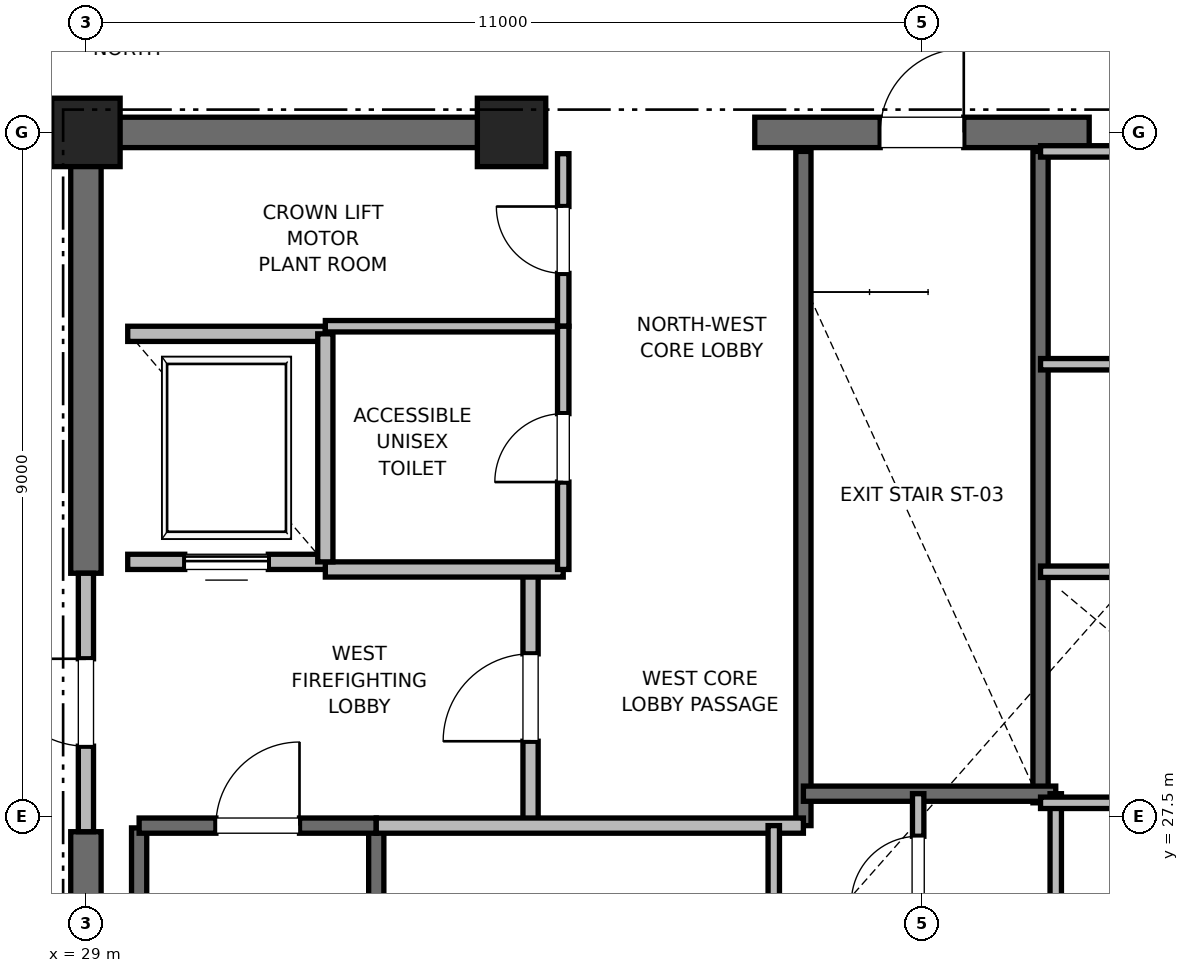
"""IFC4 building model, lengths in metres.
Left out: names, types, materials, properties, quantities, classifications, styles, units other than length and angle.
Written with IfcOpenShell. Run it as: python <this file> out.ifc"""

import sys

from ifc_helpers import new_model, si_unit, direction, frame, frame_2d, origin, origin_2d, place, context, subcontext, project, spatial, rectangle, extrude, element, fill, save


model = new_model("IFC4")
c1 = context("Model", 3, precision=1e-05, world=origin(), true_north=direction((0.0, 1.0)))
c2 = subcontext(c1, "Body", "Model", "MODEL_VIEW")
j1 = project(units=[si_unit("LENGTHUNIT", "METRE"), si_unit("PLANEANGLEUNIT", "RADIAN")], contexts=[c1])
p1 = place(None, origin())
s1 = spatial("IfcSite", under=j1, at=p1, CompositionType="ELEMENT")
p2 = place(p1, origin())
s2 = spatial("IfcBuilding", under=s1, at=p2, CompositionType="ELEMENT")
p3 = place(p2, frame((0.0, 0.0, 354.3)))
s3 = spatial("IfcBuildingStorey", under=s2, at=p3, CompositionType="ELEMENT", Elevation=354.3)
for number, where, z_axis, x_axis in (
    (1, (29.0, 36.5, 0.0), (0.0, 0.0, 1.0), (1.0, 0.0, 0.0)),
    (2, (34.6, 36.5, 0.0), (0.0, 0.0, 1.0), (1.0, 0.0, 0.0)),
):
    element("IfcColumn", number, at=place(p3, frame(where, z_axis=z_axis, x_axis=x_axis)), inside=s3, PredefinedType="PILASTER", context=c2, shape_type="SweptSolid", body=[
        extrude(rectangle(XDim=0.9, YDim=0.9, at=origin_2d()), origin(), (0.0, 0.0, 1.0), 5.5),
    ])
p4 = place(p3, frame((29.0, 36.5, 0.0), z_axis=(0.0, 0.0, 1.0), x_axis=(1.0, 0.0, 0.0)))
e3 = element("IfcWall", 3, at=p4, inside=s3, PredefinedType="SHEAR", context=c2, shape_type="SweptSolid", body=[
    extrude(rectangle(XDim=5.8, YDim=0.4, at=frame_2d((2.9, 0.0))), origin(), (0.0, 0.0, 1.0), 5.24),
])
p5 = place(p3, frame((37.8, 36.5, 0.0), z_axis=(0.0, 0.0, 1.0), x_axis=(1.0, 0.0, 0.0)))
e4 = element("IfcWall", 4, at=p5, inside=s3, PredefinedType="SHEAR", context=c2, shape_type="SweptSolid", body=[
    extrude(rectangle(XDim=4.4, YDim=0.4, at=frame_2d((2.2, 0.0))), origin(), (0.0, 0.0, 1.0), 5.24),
])
p6 = place(p5, frame((1.65, 0.0, 0.0)))
e5 = element("IfcOpeningElement", 5, at=p6, cuts=e4, PredefinedType="OPENING", context=c2, shape_type="SweptSolid", body=[
    extrude(rectangle(XDim=1.1, YDim=2.15, at=frame_2d((0.55, 1.075))), frame((0.0, 0.2, 0.0), z_axis=(0.0, -1.0, 0.0), x_axis=(1.0, 0.0, 0.0)), (0.0, 0.0, 1.0), 0.4),
])
p7 = place(p3, frame((29.0, 18.5, 0.0), z_axis=(0.0, 0.0, 1.0), x_axis=(0.0, 1.0, 0.0)))
e6 = element("IfcWall", 6, at=p7, inside=s3, PredefinedType="SHEAR", context=c2, shape_type="SweptSolid", body=[
    extrude(rectangle(XDim=8.8, YDim=0.4, at=frame_2d((4.4, 0.0))), origin(), (0.0, 0.0, 1.0), 5.24),
])
p8 = place(p3, frame((29.0, 30.7, 0.0), z_axis=(0.0, 0.0, 1.0), x_axis=(0.0, 1.0, 0.0)))
e7 = element("IfcWall", 7, at=p8, inside=s3, PredefinedType="SHEAR", context=c2, shape_type="SweptSolid", body=[
    extrude(rectangle(XDim=5.8, YDim=0.4, at=frame_2d((2.9, 0.0))), origin(), (0.0, 0.0, 1.0), 5.24),
])
p9 = place(p3, frame((29.7, 19.2, 0.0), z_axis=(0.0, 0.0, 1.0), x_axis=(0.0, 1.0, 0.0)))
e8 = element("IfcWall", 8, at=p9, inside=s3, PredefinedType="SOLIDWALL", context=c2, shape_type="SweptSolid", body=[
    extrude(rectangle(XDim=8.15, YDim=0.2, at=frame_2d((4.075, 0.0))), origin(), (0.0, 0.0, 1.0), 5.24),
])
p10 = place(p3, frame((32.82, 18.6, 0.0), z_axis=(0.0, 0.0, 1.0), x_axis=(0.0, 1.0, 0.0)))
e9 = element("IfcWall", 9, at=p10, inside=s3, PredefinedType="SOLIDWALL", context=c2, shape_type="SweptSolid", body=[
    extrude(rectangle(XDim=8.78, YDim=0.2, at=frame_2d((4.39, 0.0))), origin(), (0.0, 0.0, 1.0), 5.24),
])
p11 = place(p3, frame((29.7, 27.38, 0.0), z_axis=(0.0, 0.0, 1.0), x_axis=(1.0, 0.0, 0.0)))
e10 = element("IfcWall", 10, at=p11, inside=s3, PredefinedType="SOLIDWALL", context=c2, shape_type="SweptSolid", body=[
    extrude(rectangle(XDim=3.12, YDim=0.2, at=frame_2d((1.56, 0.0))), origin(), (0.0, 0.0, 1.0), 5.24),
])
p12 = place(p11, frame((1.01, 0.0, 0.0)))
e11 = element("IfcOpeningElement", 11, at=p12, cuts=e10, PredefinedType="OPENING", context=c2, shape_type="SweptSolid", body=[
    extrude(rectangle(XDim=1.1, YDim=2.15, at=frame_2d((0.55, 1.075))), frame((0.0, 0.1, 0.0), z_axis=(0.0, -1.0, 0.0), x_axis=(1.0, 0.0, 0.0)), (0.0, 0.0, 1.0), 0.2),
])
p13 = place(p3, frame((38.44, 27.38, 0.0), z_axis=(0.0, 0.0, 1.0), x_axis=(0.0, 1.0, 0.0)))
e12 = element("IfcWall", 12, at=p13, inside=s3, PredefinedType="SOLIDWALL", context=c2, shape_type="SweptSolid", body=[
    extrude(rectangle(XDim=8.87, YDim=0.2, at=frame_2d((4.435, 0.0))), origin(), (0.0, 0.0, 1.0), 5.24),
])
p14 = place(p3, frame((41.56, 27.68, 0.0), z_axis=(0.0, 0.0, 1.0), x_axis=(0.0, 1.0, 0.0)))
e13 = element("IfcWall", 13, at=p14, inside=s3, PredefinedType="SOLIDWALL", context=c2, shape_type="SweptSolid", body=[
    extrude(rectangle(XDim=8.57, YDim=0.2, at=frame_2d((4.285, 0.0))), origin(), (0.0, 0.0, 1.0), 5.24),
])
p15 = place(p3, frame((38.44, 27.8, 0.0), z_axis=(0.0, 0.0, 1.0), x_axis=(1.0, 0.0, 0.0)))
e14 = element("IfcWall", 14, at=p15, inside=s3, PredefinedType="SOLIDWALL", context=c2, shape_type="SweptSolid", body=[
    extrude(rectangle(XDim=3.32, YDim=0.2, at=frame_2d((1.66, 0.0))), origin(), (0.0, 0.0, 1.0), 5.24),
])
p16 = place(p3, frame((34.85, 27.38, 0.0), z_axis=(0.0, 0.0, 1.0), x_axis=(0.0, 1.0, 0.0)))
e15 = element("IfcWall", 15, at=p16, inside=s3, PredefinedType="PARTITIONING", context=c2, shape_type="SweptSolid", body=[
    extrude(rectangle(XDim=3.37, YDim=0.2, at=frame_2d((1.685, 0.0))), origin(), (0.0, 0.0, 1.0), 5.24),
])
p17 = place(p16, frame((1.11, 0.0, 0.0)))
e16 = element("IfcOpeningElement", 16, at=p17, cuts=e15, PredefinedType="OPENING", context=c2, shape_type="SweptSolid", body=[
    extrude(rectangle(XDim=1.15, YDim=2.2, at=frame_2d((0.575, 1.1))), frame((0.0, 0.1, 0.0), z_axis=(0.0, -1.0, 0.0), x_axis=(1.0, 0.0, 0.0)), (0.0, 0.0, 1.0), 0.2),
])
p18 = place(p3, frame((29.0, 27.3, 0.0), z_axis=(0.0, 0.0, 1.0), x_axis=(0.0, 1.0, 0.0)))
e17 = element("IfcWall", 17, at=p18, inside=s3, PredefinedType="PARTITIONING", context=c2, shape_type="SweptSolid", body=[
    extrude(rectangle(XDim=3.4, YDim=0.2, at=frame_2d((1.7, 0.0))), origin(), (0.0, 0.0, 1.0), 4.32),
])
p19 = place(p18, frame((1.125, 0.0, 0.0)))
e18 = element("IfcOpeningElement", 18, at=p19, cuts=e17, PredefinedType="OPENING", context=c2, shape_type="SweptSolid", body=[
    extrude(rectangle(XDim=1.15, YDim=2.2, at=frame_2d((0.575, 1.1))), frame((0.0, 0.1, 0.0), z_axis=(0.0, -1.0, 0.0), x_axis=(1.0, 0.0, 0.0)), (0.0, 0.0, 1.0), 0.2),
])
p20 = place(p3, frame((32.82, 27.38, 0.0), z_axis=(0.0, 0.0, 1.0), x_axis=(1.0, 0.0, 0.0)))
e19 = element("IfcWall", 19, at=p20, inside=s3, PredefinedType="PARTITIONING", context=c2, shape_type="SweptSolid", body=[
    extrude(rectangle(XDim=5.62, YDim=0.2, at=frame_2d((2.81, 0.0))), origin(), (0.0, 0.0, 1.0), 5.24),
])
p21 = place(p3, frame((32.15, 30.75, 0.0), z_axis=(0.0, 0.0, 1.0), x_axis=(1.0, 0.0, 0.0)))
e20 = element("IfcWall", 20, at=p21, inside=s3, PredefinedType="PARTITIONING", context=c2, shape_type="SweptSolid", body=[
    extrude(rectangle(XDim=3.13, YDim=0.2, at=frame_2d((1.565, 0.0))), origin(), (0.0, 0.0, 1.0), 5.24),
])
p22 = place(p3, frame((29.55, 30.85, 0.0), z_axis=(0.0, 0.0, 1.0), x_axis=(1.0, 0.0, 0.0)))
e21 = element("IfcWall", 21, at=p22, inside=s3, PredefinedType="SOLIDWALL", context=c2, shape_type="SweptSolid", body=[
    extrude(rectangle(XDim=2.6, YDim=0.2, at=frame_2d((1.3, 0.0))), origin(), (0.0, 0.0, 1.0), 4.32),
])
p23 = place(p22, frame((0.75, 0.0, 0.0)))
e22 = element("IfcOpeningElement", 22, at=p23, cuts=e21, PredefinedType="OPENING", context=c2, shape_type="SweptSolid", body=[
    extrude(rectangle(XDim=1.1, YDim=2.2, at=frame_2d((0.55, 1.1))), frame((0.0, 0.1, 0.0), z_axis=(0.0, -1.0, 0.0), x_axis=(1.0, 0.0, 0.0)), (0.0, 0.0, 1.0), 0.2),
])
p24 = place(p3, frame((32.15, 33.85, 0.0), z_axis=(0.0, 0.0, 1.0), x_axis=(-1.0, 0.0, 0.0)))
e23 = element("IfcWall", 23, at=p24, inside=s3, PredefinedType="SOLIDWALL", context=c2, shape_type="SweptSolid", body=[
    extrude(rectangle(XDim=2.6, YDim=0.2, at=frame_2d((1.3, 0.0))), origin(), (0.0, 0.0, 1.0), 5.24),
])
p25 = place(p3, frame((32.15, 30.85, 0.0), z_axis=(0.0, 0.0, 1.0), x_axis=(0.0, 1.0, 0.0)))
e24 = element("IfcWall", 24, at=p25, inside=s3, PredefinedType="SOLIDWALL", context=c2, shape_type="SweptSolid", body=[
    extrude(rectangle(XDim=3.0, YDim=0.2, at=frame_2d((1.5, 0.0))), origin(), (0.0, 0.0, 1.0), 5.24),
])
p26 = place(p3, frame((41.76, 23.8, 0.0), z_axis=(0.0, 0.0, 1.0), x_axis=(0.0, 1.0, 0.0)))
e25 = element("IfcWall", 25, at=p26, inside=s3, PredefinedType="PARTITIONING", context=c2, shape_type="SweptSolid", body=[
    extrude(rectangle(XDim=4.0, YDim=0.15, at=frame_2d((2.0, 0.0))), origin(), (0.0, 0.0, 1.0), 2.85),
])
p27 = place(p3, frame((39.95, 25.8, 0.0), z_axis=(0.0, 0.0, 1.0), x_axis=(0.0, 1.0, 0.0)))
e26 = element("IfcWall", 26, at=p27, inside=s3, PredefinedType="PARTITIONING", context=c2, shape_type="SweptSolid", body=[
    extrude(rectangle(XDim=2.0, YDim=0.15, at=frame_2d((1.0, 0.0))), origin(), (0.0, 0.0, 1.0), 2.85),
])
p28 = place(p27, frame((0.56, 0.0, 0.0)))
e27 = element("IfcOpeningElement", 27, at=p28, cuts=e26, PredefinedType="OPENING", context=c2, shape_type="SweptSolid", body=[
    extrude(rectangle(XDim=0.88, YDim=2.1, at=frame_2d((0.44, 1.05))), frame((0.0, 0.075, 0.0), z_axis=(0.0, -1.0, 0.0), x_axis=(1.0, 0.0, 0.0)), (0.0, 0.0, 1.0), 0.15),
])
p29 = place(p3, frame((32.15, 33.95, 0.0), z_axis=(0.0, 0.0, 1.0), x_axis=(1.0, 0.0, 0.0)))
e28 = element("IfcWall", 28, at=p29, inside=s3, PredefinedType="PARTITIONING", context=c2, shape_type="SweptSolid", body=[
    extrude(rectangle(XDim=3.13, YDim=0.15, at=frame_2d((1.565, 0.0))), origin(), (0.0, 0.0, 1.0), 2.85),
])
p30 = place(p3, frame((35.28, 33.95, 0.0), z_axis=(0.0, 0.0, 1.0), x_axis=(0.0, 1.0, 0.0)))
e29 = element("IfcWall", 29, at=p30, inside=s3, PredefinedType="PARTITIONING", context=c2, shape_type="SweptSolid", body=[
    extrude(rectangle(XDim=2.27, YDim=0.15, at=frame_2d((1.135, 0.0))), origin(), (0.0, 0.0, 1.0), 2.85),
])
p31 = place(p30, frame((0.695, 0.0, 0.0)))
e30 = element("IfcOpeningElement", 30, at=p31, cuts=e29, PredefinedType="OPENING", context=c2, shape_type="SweptSolid", body=[
    extrude(rectangle(XDim=0.88, YDim=2.1, at=frame_2d((0.44, 1.05))), frame((0.0, 0.075, 0.0), z_axis=(0.0, -1.0, 0.0), x_axis=(1.0, 0.0, 0.0)), (0.0, 0.0, 1.0), 0.15),
])
p32 = place(p3, frame((35.28, 30.75, 0.0), z_axis=(0.0, 0.0, 1.0), x_axis=(0.0, 1.0, 0.0)))
e31 = element("IfcWall", 31, at=p32, inside=s3, PredefinedType="PARTITIONING", context=c2, shape_type="SweptSolid", body=[
    extrude(rectangle(XDim=3.2, YDim=0.15, at=frame_2d((1.6, 0.0))), origin(), (0.0, 0.0, 1.0), 2.85),
])
p33 = place(p32, frame((1.15, 0.0, 0.0)))
e32 = element("IfcOpeningElement", 32, at=p33, cuts=e31, PredefinedType="OPENING", context=c2, shape_type="SweptSolid", body=[
    extrude(rectangle(XDim=0.9, YDim=2.1, at=frame_2d((0.45, 1.05))), frame((0.0, 0.075, 0.0), z_axis=(0.0, -1.0, 0.0), x_axis=(1.0, 0.0, 0.0)), (0.0, 0.0, 1.0), 0.15),
])
p34 = place(p3, frame((38.05, 18.6, 0.0), z_axis=(0.0, 0.0, 1.0), x_axis=(0.0, 1.0, 0.0)))
e33 = element("IfcWall", 33, at=p34, inside=s3, PredefinedType="PARTITIONING", context=c2, shape_type="SweptSolid", body=[
    extrude(rectangle(XDim=8.78, YDim=0.15, at=frame_2d((4.39, 0.0))), origin(), (0.0, 0.0, 1.0), 2.85),
])
p35 = place(p34, frame((3.95, 0.0, 0.0)))
e34 = element("IfcOpeningElement", 34, at=p35, cuts=e33, PredefinedType="OPENING", context=c2, shape_type="SweptSolid", body=[
    extrude(rectangle(XDim=0.88, YDim=2.1, at=frame_2d((0.44, 1.05))), frame((0.0, 0.075, 0.0), z_axis=(0.0, -1.0, 0.0), x_axis=(1.0, 0.0, 0.0)), (0.0, 0.0, 1.0), 0.15),
])
p36 = place(p3, frame((41.56, 27.68, 0.0), z_axis=(0.0, 0.0, 1.0), x_axis=(1.0, 0.0, 0.0)))
e35 = element("IfcWall", 35, at=p36, inside=s3, PredefinedType="PARTITIONING", context=c2, shape_type="SweptSolid", body=[
    extrude(rectangle(XDim=3.59, YDim=0.15, at=frame_2d((1.795, 0.0))), origin(), (0.0, 0.0, 1.0), 2.85),
])
p37 = place(p3, frame((41.56, 30.72, 0.0), z_axis=(0.0, 0.0, 1.0), x_axis=(1.0, 0.0, 0.0)))
e36 = element("IfcWall", 36, at=p37, inside=s3, PredefinedType="PARTITIONING", context=c2, shape_type="SweptSolid", body=[
    extrude(rectangle(XDim=3.59, YDim=0.15, at=frame_2d((1.795, 0.0))), origin(), (0.0, 0.0, 1.0), 2.85),
])
p38 = place(p37, frame((1.355, 0.0, 0.0)))
e37 = element("IfcOpeningElement", 37, at=p38, cuts=e36, PredefinedType="OPENING", context=c2, shape_type="SweptSolid", body=[
    extrude(rectangle(XDim=0.88, YDim=2.1, at=frame_2d((0.44, 1.05))), frame((0.0, 0.075, 0.0), z_axis=(0.0, -1.0, 0.0), x_axis=(1.0, 0.0, 0.0)), (0.0, 0.0, 1.0), 0.15),
])
p39 = place(p3, frame((41.56, 36.25, 0.0), z_axis=(0.0, 0.0, 1.0), x_axis=(1.0, 0.0, 0.0)))
e38 = element("IfcWall", 38, at=p39, inside=s3, PredefinedType="PARTITIONING", context=c2, shape_type="SweptSolid", body=[
    extrude(rectangle(XDim=2.94, YDim=0.15, at=frame_2d((1.47, 0.0))), origin(), (0.0, 0.0, 1.0), 2.85),
])
p40 = place(p3, frame((41.56, 33.45, 0.0), z_axis=(0.0, 0.0, 1.0), x_axis=(1.0, 0.0, 0.0)))
e39 = element("IfcWall", 39, at=p40, inside=s3, PredefinedType="PARTITIONING", context=c2, shape_type="SweptSolid", body=[
    extrude(rectangle(XDim=2.94, YDim=0.15, at=frame_2d((1.47, 0.0))), origin(), (0.0, 0.0, 1.0), 2.85),
])
p41 = place(p40, frame((1.03, 0.0, 0.0)))
e40 = element("IfcOpeningElement", 40, at=p41, cuts=e39, PredefinedType="OPENING", context=c2, shape_type="SweptSolid", body=[
    extrude(rectangle(XDim=0.88, YDim=2.1, at=frame_2d((0.44, 1.05))), frame((0.0, 0.075, 0.0), z_axis=(0.0, -1.0, 0.0), x_axis=(1.0, 0.0, 0.0)), (0.0, 0.0, 1.0), 0.15),
])
p42 = place(p12, origin())
e41 = element("IfcDoor", 41, at=p42, inside=s3, OperationType="SINGLE_SWING_RIGHT", PredefinedType="DOOR", context=c2, shape_type="SweptSolid", body=[
    extrude(rectangle(XDim=1.1, YDim=2.15, at=frame_2d((0.55, 1.075))), frame((0.0, 0.025, 0.0), z_axis=(0.0, -1.0, 0.0), x_axis=(1.0, 0.0, 0.0)), (0.0, 0.0, 1.0), 0.05),
])
fill(e11, e41)
p43 = place(p6, origin())
e42 = element("IfcDoor", 42, at=p43, inside=s3, OperationType="SINGLE_SWING_RIGHT", PredefinedType="DOOR", context=c2, shape_type="SweptSolid", body=[
    extrude(rectangle(XDim=1.1, YDim=2.15, at=frame_2d((0.55, 1.075))), frame((0.0, 0.025, 0.0), z_axis=(0.0, -1.0, 0.0), x_axis=(1.0, 0.0, 0.0)), (0.0, 0.0, 1.0), 0.05),
])
fill(e5, e42)
p44 = place(p17, origin())
e43 = element("IfcDoor", 43, at=p44, inside=s3, OperationType="SINGLE_SWING_LEFT", PredefinedType="DOOR", context=c2, shape_type="SweptSolid", body=[
    extrude(rectangle(XDim=1.15, YDim=2.2, at=frame_2d((0.575, 1.1))), frame((0.0, 0.025, 0.0), z_axis=(0.0, -1.0, 0.0), x_axis=(1.0, 0.0, 0.0)), (0.0, 0.0, 1.0), 0.05),
])
fill(e16, e43)
p45 = place(p19, origin())
e44 = element("IfcDoor", 44, at=p45, inside=s3, OperationType="SINGLE_SWING_RIGHT", PredefinedType="DOOR", context=c2, shape_type="SweptSolid", body=[
    extrude(rectangle(XDim=1.15, YDim=2.2, at=frame_2d((0.575, 1.1))), frame((0.0, 0.025, 0.0), z_axis=(0.0, -1.0, 0.0), x_axis=(1.0, 0.0, 0.0)), (0.0, 0.0, 1.0), 0.05),
])
fill(e18, e44)
p46 = place(p23, origin())
e45 = element("IfcDoor", 45, at=p46, inside=s3, OperationType="SLIDING_TO_RIGHT", PredefinedType="DOOR", context=c2, shape_type="SweptSolid", body=[
    extrude(rectangle(XDim=1.1, YDim=2.2, at=frame_2d((0.55, 1.1))), frame((0.0, 0.025, 0.0), z_axis=(0.0, -1.0, 0.0), x_axis=(1.0, 0.0, 0.0)), (0.0, 0.0, 1.0), 0.05),
])
fill(e22, e45)
p47 = place(p28, origin())
e46 = element("IfcDoor", 46, at=p47, inside=s3, OperationType="SINGLE_SWING_LEFT", PredefinedType="DOOR", context=c2, shape_type="SweptSolid", body=[
    extrude(rectangle(XDim=0.88, YDim=2.1, at=frame_2d((0.44, 1.05))), frame((0.0, 0.025, 0.0), z_axis=(0.0, -1.0, 0.0), x_axis=(1.0, 0.0, 0.0)), (0.0, 0.0, 1.0), 0.05),
])
fill(e27, e46)
p48 = place(p31, origin())
e47 = element("IfcDoor", 47, at=p48, inside=s3, OperationType="SINGLE_SWING_RIGHT", PredefinedType="DOOR", context=c2, shape_type="SweptSolid", body=[
    extrude(rectangle(XDim=0.88, YDim=2.1, at=frame_2d((0.44, 1.05))), frame((0.0, 0.025, 0.0), z_axis=(0.0, -1.0, 0.0), x_axis=(1.0, 0.0, 0.0)), (0.0, 0.0, 1.0), 0.05),
])
fill(e30, e47)
p49 = place(p33, origin())
e48 = element("IfcDoor", 48, at=p49, inside=s3, OperationType="SINGLE_SWING_LEFT", PredefinedType="DOOR", context=c2, shape_type="SweptSolid", body=[
    extrude(rectangle(XDim=0.9, YDim=2.1, at=frame_2d((0.45, 1.05))), frame((0.0, 0.025, 0.0), z_axis=(0.0, -1.0, 0.0), x_axis=(1.0, 0.0, 0.0)), (0.0, 0.0, 1.0), 0.05),
])
fill(e32, e48)
save(model, sys.argv[1])
